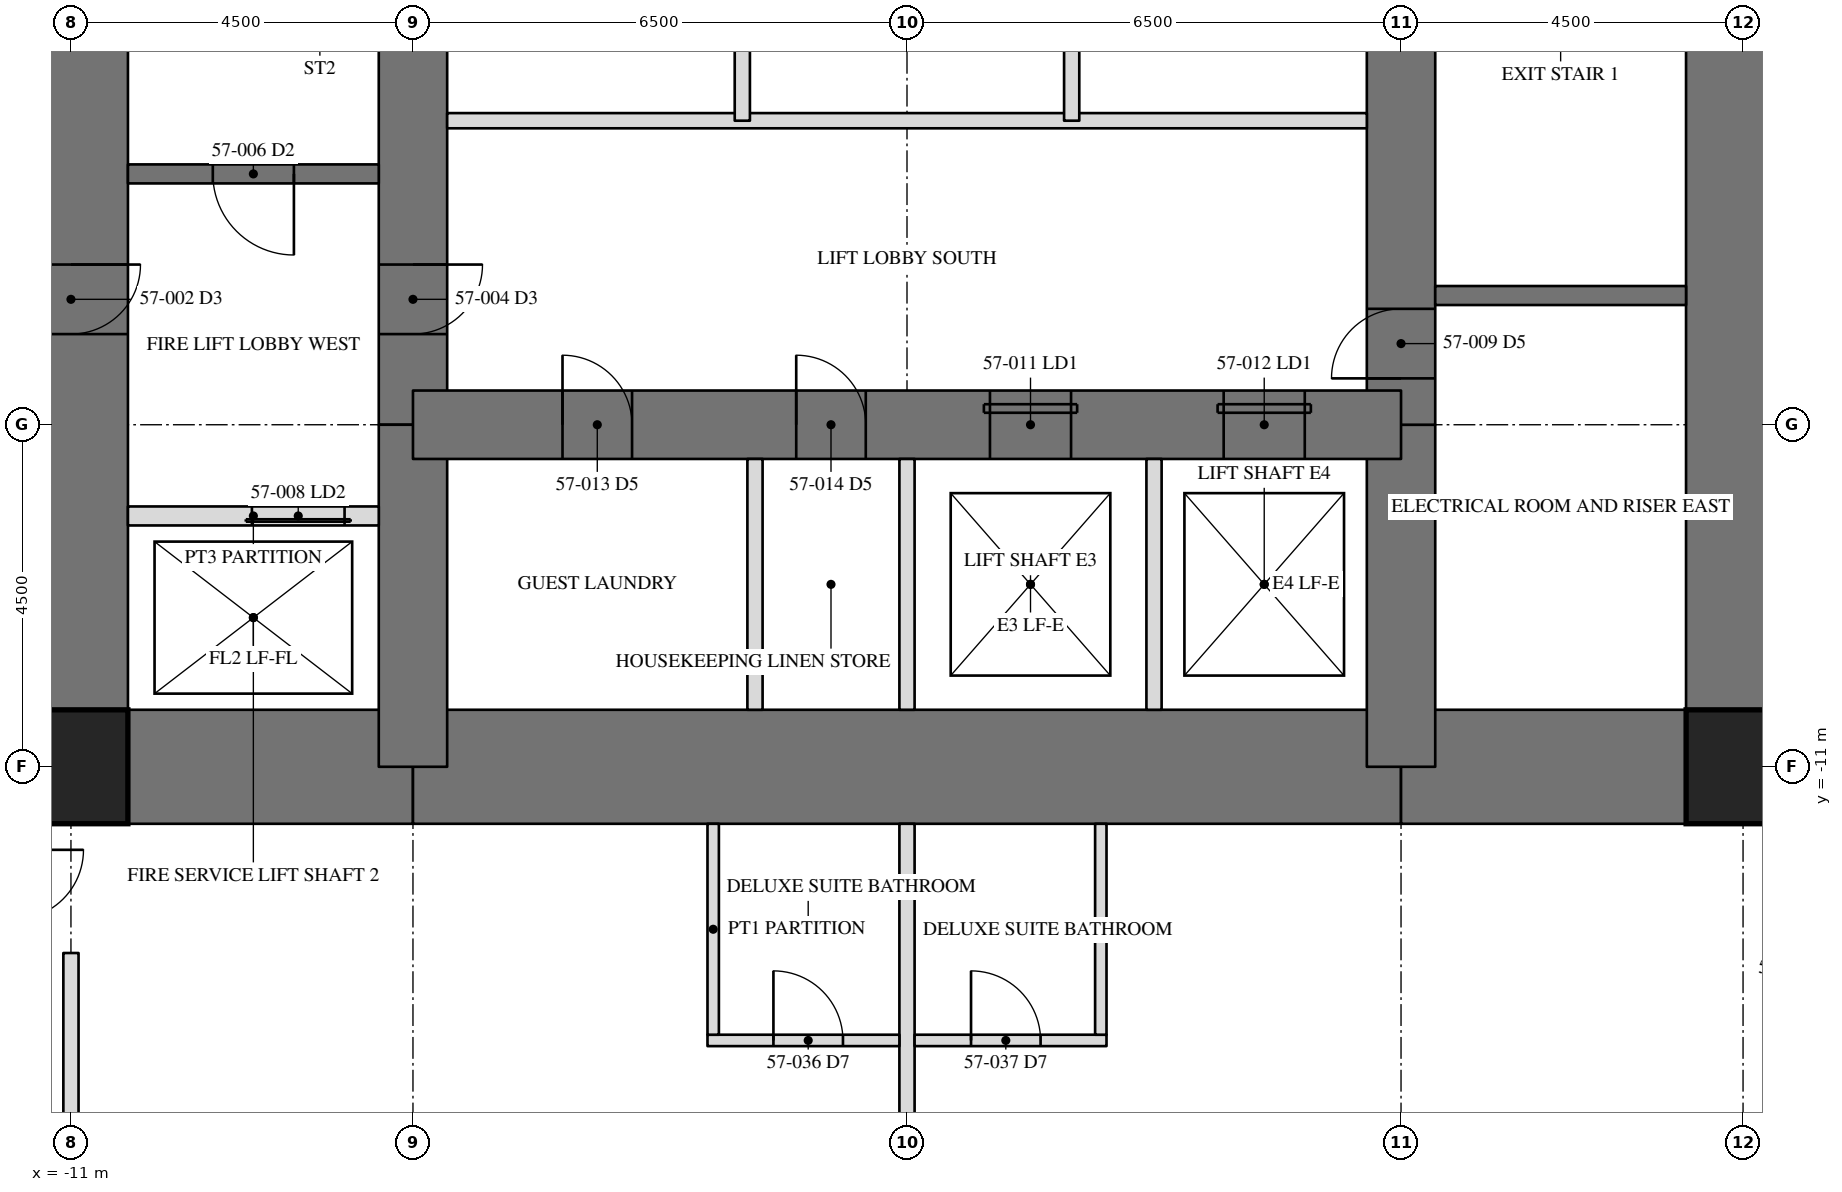
"""IFC4 building model, lengths in metres.
Left out: names, types, materials, properties, quantities, classifications, styles, units other than length and angle.
Written with IfcOpenShell. Run it as: python <this file> out.ifc"""

import sys

from ifc_helpers import new_model, si_unit, direction, frame, frame_2d, origin, origin_2d, place, context, subcontext, project, spatial, rectangle, hollow_rectangle, extrude, element, fill, save


model = new_model("IFC4")
c1 = context("Model", 3, precision=1e-05, world=origin(), true_north=direction((0.0, 1.0)))
c2 = subcontext(c1, "Body", "Model", "MODEL_VIEW")
j1 = project(units=[si_unit("LENGTHUNIT", "METRE"), si_unit("PLANEANGLEUNIT", "RADIAN")], contexts=[c1])
p1 = place(None, origin())
s1 = spatial("IfcSite", under=j1, at=p1, CompositionType="ELEMENT")
p2 = place(p1, origin())
s2 = spatial("IfcBuilding", under=s1, at=p2, CompositionType="ELEMENT")
p3 = place(p2, frame((0.0, 0.0, 236.2)))
s3 = spatial("IfcBuildingStorey", under=s2, at=p3, CompositionType="ELEMENT", Elevation=236.2)
p4 = place(p3, frame((11.0, -11.0, 0.0), z_axis=(0.0, 0.0, 1.0), x_axis=(0.0, 1.0, 0.0)))
e1 = element("IfcWall", 1, at=p4, inside=s3, PredefinedType="SHEAR", context=c2, shape_type="SweptSolid", body=[
    extrude(rectangle(XDim=22.0, YDim=1.5, at=frame_2d((11.0, 0.0))), origin(), (0.0, 0.0, 1.0), 3.5),
])
p5 = place(p4, frame((15.393, 0.0, 0.0)))
e2 = element("IfcOpeningElement", 2, at=p5, cuts=e1, PredefinedType="OPENING", context=c2, shape_type="SweptSolid", body=[
    extrude(rectangle(XDim=0.915, YDim=2.134, at=frame_2d((0.458, 1.067))), frame((0.0, 0.76, 0.0), z_axis=(0.0, -1.0, 0.0), x_axis=(1.0, 0.0, 0.0)), (0.0, 0.0, 1.0), 1.52),
])
p6 = place(p3, frame((-11.0, 11.0, 0.0), z_axis=(0.0, 0.0, 1.0), x_axis=(0.0, -1.0, 0.0)))
e3 = element("IfcWall", 3, at=p6, inside=s3, PredefinedType="SHEAR", context=c2, shape_type="SweptSolid", body=[
    extrude(rectangle(XDim=22.0, YDim=1.5, at=frame_2d((11.0, 0.0))), origin(), (0.0, 0.0, 1.0), 3.5),
])
p7 = place(p6, frame((15.393, 0.0, 0.0)))
e4 = element("IfcOpeningElement", 4, at=p7, cuts=e3, PredefinedType="OPENING", context=c2, shape_type="SweptSolid", body=[
    extrude(rectangle(XDim=0.915, YDim=2.134, at=frame_2d((0.458, 1.067))), frame((0.0, 0.76, 0.0), z_axis=(0.0, -1.0, 0.0), x_axis=(1.0, 0.0, 0.0)), (0.0, 0.0, 1.0), 1.52),
])
p8 = place(p3, frame((-11.0, -11.0, 0.0), z_axis=(0.0, 0.0, 1.0), x_axis=(1.0, 0.0, 0.0)))
e5 = element("IfcWall", 5, at=p8, inside=s3, PredefinedType="SHEAR", context=c2, shape_type="SweptSolid", body=[
    extrude(rectangle(XDim=4.5, YDim=1.5, at=frame_2d((2.25, 0.0))), origin(), (0.0, 0.0, 1.0), 3.5),
])
p9 = place(p3, frame((-6.5, -11.0, 0.0), z_axis=(0.0, 0.0, 1.0), x_axis=(1.0, 0.0, 0.0)))
e6 = element("IfcWall", 6, at=p9, inside=s3, PredefinedType="SHEAR", context=c2, shape_type="SweptSolid", body=[
    extrude(rectangle(XDim=13.0, YDim=1.5, at=frame_2d((6.5, 0.0))), origin(), (0.0, 0.0, 1.0), 3.5),
])
p10 = place(p3, frame((6.5, -11.0, 0.0), z_axis=(0.0, 0.0, 1.0), x_axis=(1.0, 0.0, 0.0)))
e7 = element("IfcWall", 7, at=p10, inside=s3, PredefinedType="SHEAR", context=c2, shape_type="SweptSolid", body=[
    extrude(rectangle(XDim=4.5, YDim=1.5, at=frame_2d((2.25, 0.0))), origin(), (0.0, 0.0, 1.0), 3.5),
])
p11 = place(p3, frame((6.5, -11.0, 0.0), z_axis=(0.0, 0.0, 1.0), x_axis=(0.0, 1.0, 0.0)))
e8 = element("IfcWall", 8, at=p11, inside=s3, PredefinedType="SHEAR", context=c2, shape_type="SweptSolid", body=[
    extrude(rectangle(XDim=4.5, YDim=0.9, at=frame_2d((2.25, 0.0))), origin(), (0.0, 0.0, 1.0), 3.5),
])
p12 = place(p3, frame((6.5, -6.5, 0.0), z_axis=(0.0, 0.0, 1.0), x_axis=(0.0, 1.0, 0.0)))
e9 = element("IfcWall", 9, at=p12, inside=s3, PredefinedType="SHEAR", context=c2, shape_type="SweptSolid", body=[
    extrude(rectangle(XDim=13.0, YDim=0.9, at=frame_2d((6.5, 0.0))), origin(), (0.0, 0.0, 1.0), 3.5),
])
p13 = place(p12, frame((10.893, 0.0, 0.0)))
e10 = element("IfcOpeningElement", 10, at=p13, cuts=e9, PredefinedType="OPENING", context=c2, shape_type="SweptSolid", body=[
    extrude(rectangle(XDim=0.915, YDim=2.134, at=frame_2d((0.458, 1.067))), frame((0.0, 0.46, 0.0), z_axis=(0.0, -1.0, 0.0), x_axis=(1.0, 0.0, 0.0)), (0.0, 0.0, 1.0), 0.92),
])
p14 = place(p12, frame((0.61, 0.0, 0.0)))
e11 = element("IfcOpeningElement", 11, at=p14, cuts=e9, PredefinedType="OPENING", context=c2, shape_type="SweptSolid", body=[
    extrude(rectangle(XDim=0.915, YDim=2.134, at=frame_2d((0.458, 1.067))), frame((0.0, 0.46, 0.0), z_axis=(0.0, -1.0, 0.0), x_axis=(1.0, 0.0, 0.0)), (0.0, 0.0, 1.0), 0.92),
])
p15 = place(p3, frame((-6.5, 6.5, 0.0), z_axis=(0.0, 0.0, 1.0), x_axis=(0.0, -1.0, 0.0)))
e12 = element("IfcWall", 12, at=p15, inside=s3, PredefinedType="SHEAR", context=c2, shape_type="SweptSolid", body=[
    extrude(rectangle(XDim=13.0, YDim=0.9, at=frame_2d((6.5, 0.0))), origin(), (0.0, 0.0, 1.0), 3.5),
])
p16 = place(p15, frame((10.893, 0.0, 0.0)))
e13 = element("IfcOpeningElement", 13, at=p16, cuts=e12, PredefinedType="OPENING", context=c2, shape_type="SweptSolid", body=[
    extrude(rectangle(XDim=0.915, YDim=2.134, at=frame_2d((0.458, 1.067))), frame((0.0, 0.46, 0.0), z_axis=(0.0, -1.0, 0.0), x_axis=(1.0, 0.0, 0.0)), (0.0, 0.0, 1.0), 0.92),
])
p17 = place(p15, frame((0.61, 0.0, 0.0)))
e14 = element("IfcOpeningElement", 14, at=p17, cuts=e12, PredefinedType="OPENING", context=c2, shape_type="SweptSolid", body=[
    extrude(rectangle(XDim=0.915, YDim=2.134, at=frame_2d((0.458, 1.067))), frame((0.0, 0.46, 0.0), z_axis=(0.0, -1.0, 0.0), x_axis=(1.0, 0.0, 0.0)), (0.0, 0.0, 1.0), 0.92),
])
p18 = place(p3, frame((-6.5, -6.5, 0.0), z_axis=(0.0, 0.0, 1.0), x_axis=(0.0, -1.0, 0.0)))
e15 = element("IfcWall", 15, at=p18, inside=s3, PredefinedType="SHEAR", context=c2, shape_type="SweptSolid", body=[
    extrude(rectangle(XDim=4.5, YDim=0.9, at=frame_2d((2.25, 0.0))), origin(), (0.0, 0.0, 1.0), 3.5),
])
p19 = place(p3, frame((-6.5, -6.5, 0.0), z_axis=(0.0, 0.0, 1.0), x_axis=(1.0, 0.0, 0.0)))
e16 = element("IfcWall", 16, at=p19, inside=s3, PredefinedType="SHEAR", context=c2, shape_type="SweptSolid", body=[
    extrude(rectangle(XDim=13.0, YDim=0.9, at=frame_2d((6.5, 0.0))), origin(), (0.0, 0.0, 1.0), 3.5),
])
p20 = place(p19, frame((7.592, 0.0, 0.0)))
e17 = element("IfcOpeningElement", 17, at=p20, cuts=e16, PredefinedType="OPENING", context=c2, shape_type="SweptSolid", body=[
    extrude(rectangle(XDim=1.067, YDim=2.134, at=frame_2d((0.533, 1.067))), frame((0.0, 0.46, 0.0), z_axis=(0.0, -1.0, 0.0), x_axis=(1.0, 0.0, 0.0)), (0.0, 0.0, 1.0), 0.92),
])
p21 = place(p19, frame((10.667, 0.0, 0.0)))
e18 = element("IfcOpeningElement", 18, at=p21, cuts=e16, PredefinedType="OPENING", context=c2, shape_type="SweptSolid", body=[
    extrude(rectangle(XDim=1.067, YDim=2.134, at=frame_2d((0.533, 1.067))), frame((0.0, 0.46, 0.0), z_axis=(0.0, -1.0, 0.0), x_axis=(1.0, 0.0, 0.0)), (0.0, 0.0, 1.0), 0.92),
])
p22 = place(p19, frame((1.968, 0.0, 0.0)))
e19 = element("IfcOpeningElement", 19, at=p22, cuts=e16, PredefinedType="OPENING", context=c2, shape_type="SweptSolid", body=[
    extrude(rectangle(XDim=0.915, YDim=2.134, at=frame_2d((0.458, 1.067))), frame((0.0, 0.46, 0.0), z_axis=(0.0, -1.0, 0.0), x_axis=(1.0, 0.0, 0.0)), (0.0, 0.0, 1.0), 0.92),
])
p23 = place(p19, frame((5.042, 0.0, 0.0)))
e20 = element("IfcOpeningElement", 20, at=p23, cuts=e16, PredefinedType="OPENING", context=c2, shape_type="SweptSolid", body=[
    extrude(rectangle(XDim=0.915, YDim=2.134, at=frame_2d((0.458, 1.067))), frame((0.0, 0.46, 0.0), z_axis=(0.0, -1.0, 0.0), x_axis=(1.0, 0.0, 0.0)), (0.0, 0.0, 1.0), 0.92),
])
for number, where, z_axis, x_axis in (
    (21, (-11.0, -11.0, 0.0), (0.0, 0.0, 1.0), (1.0, 0.0, 0.0)),
    (22, (11.0, -11.0, 0.0), (0.0, 0.0, 1.0), (1.0, 0.0, 0.0)),
):
    element("IfcColumn", number, at=place(p3, frame(where, z_axis=z_axis, x_axis=x_axis)), inside=s3, PredefinedType="COLUMN", context=c2, shape_type="SweptSolid", body=[
        extrude(hollow_rectangle(XDim=1.499, YDim=1.499, WallThickness=0.102, at=origin_2d()), origin(), (0.0, 0.0, 1.0), 3.5),
    ])
p24 = place(p3, frame((6.95, -4.8, 0.0), z_axis=(0.0, 0.0, 1.0), x_axis=(1.0, 0.0, 0.0)))
e23 = element("IfcWall", 23, at=p24, inside=s3, PredefinedType="SOLIDWALL", context=c2, shape_type="SweptSolid", body=[
    extrude(rectangle(XDim=3.3, YDim=0.25, at=frame_2d((1.65, 0.0))), origin(), (0.0, 0.0, 1.0), 3.31),
])
p25 = place(p3, frame((-6.95, -3.2, 0.0), z_axis=(0.0, 0.0, 1.0), x_axis=(-1.0, 0.0, 0.0)))
e24 = element("IfcWall", 24, at=p25, inside=s3, PredefinedType="SOLIDWALL", context=c2, shape_type="SweptSolid", body=[
    extrude(rectangle(XDim=3.3, YDim=0.25, at=frame_2d((1.65, 0.0))), origin(), (0.0, 0.0, 1.0), 3.31),
])
p26 = place(p25, frame((1.116, 0.0, 0.0)))
e25 = element("IfcOpeningElement", 25, at=p26, cuts=e24, PredefinedType="OPENING", context=c2, shape_type="SweptSolid", body=[
    extrude(rectangle(XDim=1.067, YDim=2.134, at=frame_2d((0.533, 1.067))), frame((0.0, 0.135, 0.0), z_axis=(0.0, -1.0, 0.0), x_axis=(1.0, 0.0, 0.0)), (0.0, 0.0, 1.0), 0.27),
])
p27 = place(p3, frame((-6.95, -7.7, 0.0), z_axis=(0.0, 0.0, 1.0), x_axis=(-1.0, 0.0, 0.0)))
e26 = element("IfcWall", 26, at=p27, inside=s3, PredefinedType="PARTITIONING", context=c2, shape_type="SweptSolid", body=[
    extrude(rectangle(XDim=3.3, YDim=0.25, at=frame_2d((1.65, 0.0))), origin(), (0.0, 0.0, 1.0), 3.31),
])
p28 = place(p27, frame((0.45, 0.0, 0.0)))
e27 = element("IfcOpeningElement", 27, at=p28, cuts=e26, PredefinedType="OPENING", context=c2, shape_type="SweptSolid", body=[
    extrude(rectangle(XDim=1.219, YDim=2.134, at=frame_2d((0.609, 1.067))), frame((0.0, 0.135, 0.0), z_axis=(0.0, -1.0, 0.0), x_axis=(1.0, 0.0, 0.0)), (0.0, 0.0, 1.0), 0.27),
])
p29 = place(p3, frame((6.05, -2.5, 0.0), z_axis=(0.0, 0.0, 1.0), x_axis=(-1.0, 0.0, 0.0)))
e28 = element("IfcWall", 28, at=p29, inside=s3, PredefinedType="PARTITIONING", context=c2, shape_type="SweptSolid", body=[
    extrude(rectangle(XDim=12.1, YDim=0.2, at=frame_2d((6.05, 0.0))), origin(), (0.0, 0.0, 1.0), 3.31),
])
for number, where, z_axis, x_axis in (
    (29, (0.0, -10.25, 0.0), (0.0, 0.0, 1.0), (0.0, 1.0, 0.0)),
    (30, (3.25, -10.25, 0.0), (0.0, 0.0, 1.0), (0.0, 1.0, 0.0)),
):
    element("IfcWall", number, at=place(p3, frame(where, z_axis=z_axis, x_axis=x_axis)), inside=s3, PredefinedType="PARTITIONING", context=c2, shape_type="SweptSolid", body=[
        extrude(rectangle(XDim=3.3, YDim=0.2, at=frame_2d((1.65, 0.0))), origin(), (0.0, 0.0, 1.0), 3.31),
    ])
for number, where, z_axis, x_axis in (
    (31, (-2.167, -2.5, 0.0), (0.0, 0.0, 1.0), (0.0, 1.0, 0.0)),
    (32, (2.167, -2.5, 0.0), (0.0, 0.0, 1.0), (0.0, 1.0, 0.0)),
):
    element("IfcWall", number, at=place(p3, frame(where, z_axis=z_axis, x_axis=x_axis)), inside=s3, PredefinedType="PARTITIONING", context=c2, shape_type="SweptSolid", body=[
        extrude(rectangle(XDim=5.0, YDim=0.2, at=frame_2d((2.5, 0.0))), origin(), (0.0, 0.0, 1.0), 3.31),
    ])
p30 = place(p3, frame((-2.0, -10.25, 0.0), z_axis=(0.0, 0.0, 1.0), x_axis=(0.0, 1.0, 0.0)))
e33 = element("IfcWall", 33, at=p30, inside=s3, PredefinedType="PARTITIONING", context=c2, shape_type="SweptSolid", body=[
    extrude(rectangle(XDim=3.3, YDim=0.2, at=frame_2d((1.65, 0.0))), origin(), (0.0, 0.0, 1.0), 3.31),
])
p31 = place(p3, frame((-11.0, -13.45, 0.0), z_axis=(0.0, 0.0, 1.0), x_axis=(0.0, -1.0, 0.0)))
e34 = element("IfcWall", 34, at=p31, inside=s3, PredefinedType="PARTITIONING", context=c2, shape_type="SweptSolid", body=[
    extrude(rectangle(XDim=6.465, YDim=0.2, at=frame_2d((3.232, 0.0))), origin(), (0.0, 0.0, 1.0), 2.802),
])
p32 = place(p3, frame((0.0, -11.75, 0.0), z_axis=(0.0, 0.0, 1.0), x_axis=(0.0, -1.0, 0.0)))
e35 = element("IfcWall", 35, at=p32, inside=s3, PredefinedType="PARTITIONING", context=c2, shape_type="SweptSolid", body=[
    extrude(rectangle(XDim=8.165, YDim=0.2, at=frame_2d((4.083, 0.0))), origin(), (0.0, 0.0, 1.0), 2.802),
])
p33 = place(p3, frame((-2.625, -14.6, 0.0), z_axis=(0.0, 0.0, 1.0), x_axis=(1.0, 0.0, 0.0)))
e36 = element("IfcWall", 36, at=p33, inside=s3, PredefinedType="PARTITIONING", context=c2, shape_type="SweptSolid", body=[
    extrude(rectangle(XDim=2.525, YDim=0.15, at=frame_2d((1.262, 0.0))), origin(), (0.0, 0.0, 1.0), 3.31),
])
p34 = place(p33, frame((0.867, 0.0, 0.0)))
e37 = element("IfcOpeningElement", 37, at=p34, cuts=e36, PredefinedType="OPENING", context=c2, shape_type="SweptSolid", body=[
    extrude(rectangle(XDim=0.915, YDim=2.032, at=frame_2d((0.458, 1.016))), frame((0.0, 0.085, 0.0), z_axis=(0.0, -1.0, 0.0), x_axis=(1.0, 0.0, 0.0)), (0.0, 0.0, 1.0), 0.17),
])
p35 = place(p3, frame((-2.55, -11.75, 0.0), z_axis=(0.0, 0.0, 1.0), x_axis=(0.0, -1.0, 0.0)))
e38 = element("IfcWall", 38, at=p35, inside=s3, PredefinedType="PARTITIONING", context=c2, shape_type="SweptSolid", body=[
    extrude(rectangle(XDim=2.775, YDim=0.15, at=frame_2d((1.387, 0.0))), origin(), (0.0, 0.0, 1.0), 3.31),
])
p36 = place(p3, frame((0.1, -14.6, 0.0), z_axis=(0.0, 0.0, 1.0), x_axis=(1.0, 0.0, 0.0)))
e39 = element("IfcWall", 39, at=p36, inside=s3, PredefinedType="PARTITIONING", context=c2, shape_type="SweptSolid", body=[
    extrude(rectangle(XDim=2.525, YDim=0.15, at=frame_2d((1.262, 0.0))), origin(), (0.0, 0.0, 1.0), 3.31),
])
p37 = place(p36, frame((0.742, 0.0, 0.0)))
e40 = element("IfcOpeningElement", 40, at=p37, cuts=e39, PredefinedType="OPENING", context=c2, shape_type="SweptSolid", body=[
    extrude(rectangle(XDim=0.915, YDim=2.032, at=frame_2d((0.458, 1.016))), frame((0.0, 0.085, 0.0), z_axis=(0.0, -1.0, 0.0), x_axis=(1.0, 0.0, 0.0)), (0.0, 0.0, 1.0), 0.17),
])
p38 = place(p3, frame((2.55, -11.75, 0.0), z_axis=(0.0, 0.0, 1.0), x_axis=(0.0, -1.0, 0.0)))
e41 = element("IfcWall", 41, at=p38, inside=s3, PredefinedType="PARTITIONING", context=c2, shape_type="SweptSolid", body=[
    extrude(rectangle(XDim=2.775, YDim=0.15, at=frame_2d((1.387, 0.0))), origin(), (0.0, 0.0, 1.0), 3.31),
])
p39 = place(p16, origin())
e42 = element("IfcDoor", 42, at=p39, inside=s3, OperationType="SINGLE_SWING_RIGHT", PredefinedType="DOOR", context=c2, shape_type="SweptSolid", body=[
    extrude(rectangle(XDim=0.915, YDim=2.134, at=frame_2d((0.458, 1.067))), frame((0.0, -0.375, 0.0), z_axis=(0.0, -1.0, 0.0), x_axis=(1.0, 0.0, 0.0)), (0.0, 0.0, 1.0), 0.05),
])
fill(e13, e42)
p40 = place(p26, origin())
e43 = element("IfcDoor", 43, at=p40, inside=s3, OperationType="SINGLE_SWING_LEFT", PredefinedType="DOOR", context=c2, shape_type="SweptSolid", body=[
    extrude(rectangle(XDim=1.067, YDim=2.134, at=frame_2d((0.533, 1.067))), frame((0.0, 0.025, 0.0), z_axis=(0.0, -1.0, 0.0), x_axis=(1.0, 0.0, 0.0)), (0.0, 0.0, 1.0), 0.05),
])
fill(e25, e43)
p41 = place(p28, origin())
e44 = element("IfcDoor", 44, at=p41, inside=s3, OperationType="SLIDING_TO_LEFT", PredefinedType="DOOR", context=c2, shape_type="SweptSolid", body=[
    extrude(rectangle(XDim=1.219, YDim=2.134, at=frame_2d((0.609, 1.067))), frame((0.0, 0.025, 0.0), z_axis=(0.0, -1.0, 0.0), x_axis=(1.0, 0.0, 0.0)), (0.0, 0.0, 1.0), 0.05),
])
fill(e27, e44)
p42 = place(p14, origin())
e45 = element("IfcDoor", 45, at=p42, inside=s3, OperationType="SINGLE_SWING_RIGHT", PredefinedType="DOOR", context=c2, shape_type="SweptSolid", body=[
    extrude(rectangle(XDim=0.915, YDim=2.134, at=frame_2d((0.458, 1.067))), frame((0.0, -0.375, 0.0), z_axis=(0.0, -1.0, 0.0), x_axis=(1.0, 0.0, 0.0)), (0.0, 0.0, 1.0), 0.05),
])
fill(e11, e45)
p43 = place(p20, origin())
e46 = element("IfcDoor", 46, at=p43, inside=s3, OperationType="SLIDING_TO_LEFT", PredefinedType="DOOR", context=c2, shape_type="SweptSolid", body=[
    extrude(rectangle(XDim=1.067, YDim=2.134, at=frame_2d((0.533, 1.067))), frame((0.0, -0.375, 0.0), z_axis=(0.0, -1.0, 0.0), x_axis=(1.0, 0.0, 0.0)), (0.0, 0.0, 1.0), 0.05),
])
fill(e17, e46)
p44 = place(p21, origin())
e47 = element("IfcDoor", 47, at=p44, inside=s3, OperationType="SLIDING_TO_LEFT", PredefinedType="DOOR", context=c2, shape_type="SweptSolid", body=[
    extrude(rectangle(XDim=1.067, YDim=2.134, at=frame_2d((0.533, 1.067))), frame((0.0, -0.375, 0.0), z_axis=(0.0, -1.0, 0.0), x_axis=(1.0, 0.0, 0.0)), (0.0, 0.0, 1.0), 0.05),
])
fill(e18, e47)
p45 = place(p22, origin())
e48 = element("IfcDoor", 48, at=p45, inside=s3, OperationType="SINGLE_SWING_RIGHT", PredefinedType="DOOR", context=c2, shape_type="SweptSolid", body=[
    extrude(rectangle(XDim=0.915, YDim=2.134, at=frame_2d((0.458, 1.067))), frame((0.0, -0.375, 0.0), z_axis=(0.0, -1.0, 0.0), x_axis=(1.0, 0.0, 0.0)), (0.0, 0.0, 1.0), 0.05),
])
fill(e19, e48)
p46 = place(p23, origin())
e49 = element("IfcDoor", 49, at=p46, inside=s3, OperationType="SINGLE_SWING_RIGHT", PredefinedType="DOOR", context=c2, shape_type="SweptSolid", body=[
    extrude(rectangle(XDim=0.915, YDim=2.134, at=frame_2d((0.458, 1.067))), frame((0.0, -0.375, 0.0), z_axis=(0.0, -1.0, 0.0), x_axis=(1.0, 0.0, 0.0)), (0.0, 0.0, 1.0), 0.05),
])
fill(e20, e49)
p47 = place(p34, origin())
e50 = element("IfcDoor", 50, at=p47, inside=s3, OperationType="SINGLE_SWING_LEFT", PredefinedType="DOOR", context=c2, shape_type="SweptSolid", body=[
    extrude(rectangle(XDim=0.915, YDim=2.032, at=frame_2d((0.458, 1.016))), frame((0.0, 0.025, 0.0), z_axis=(0.0, -1.0, 0.0), x_axis=(1.0, 0.0, 0.0)), (0.0, 0.0, 1.0), 0.05),
])
fill(e37, e50)
p48 = place(p37, origin())
e51 = element("IfcDoor", 51, at=p48, inside=s3, OperationType="SINGLE_SWING_LEFT", PredefinedType="DOOR", context=c2, shape_type="SweptSolid", body=[
    extrude(rectangle(XDim=0.915, YDim=2.032, at=frame_2d((0.458, 1.016))), frame((0.0, 0.025, 0.0), z_axis=(0.0, -1.0, 0.0), x_axis=(1.0, 0.0, 0.0)), (0.0, 0.0, 1.0), 0.05),
])
fill(e40, e51)
save(model, sys.argv[1])
